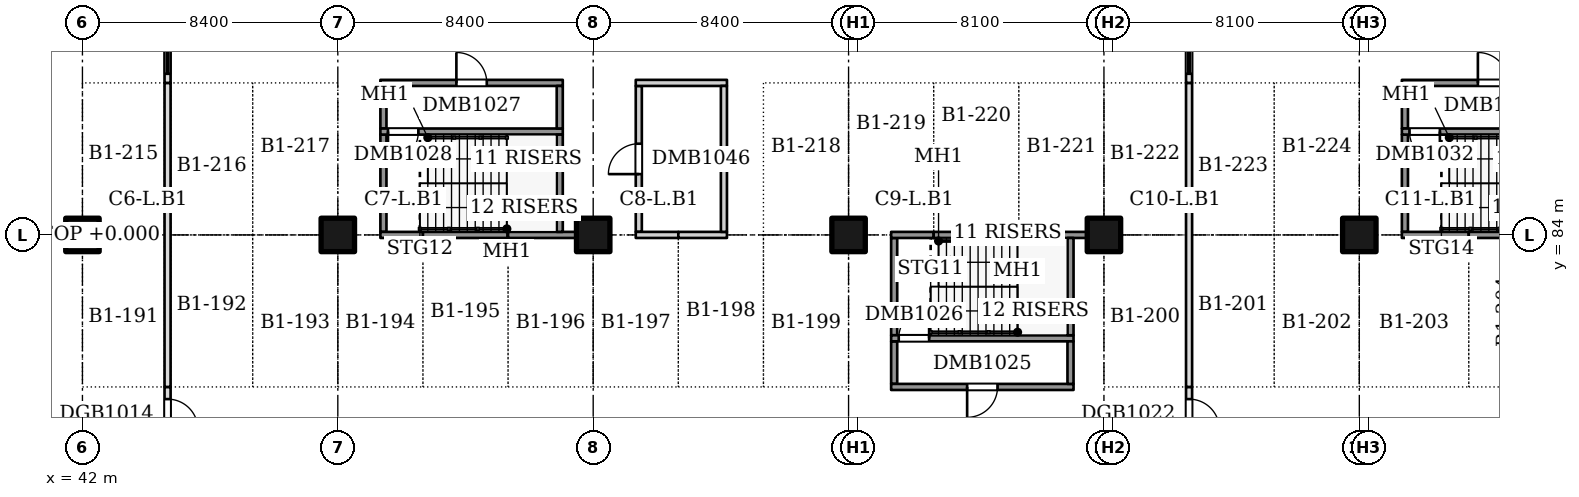
"""IFC4 building model, lengths in metres.
Left out: names, types, materials, properties, quantities, classifications, styles, units other than length and angle.
Written with IfcOpenShell. Run it as: python <this file> out.ifc"""

import sys

from ifc_helpers import new_model, si_unit, direction, frame, frame_2d, origin, origin_2d, place, context, subcontext, project, spatial, rectangle, extrude, element, fill, save


model = new_model("IFC4")
c1 = context("Model", 3, precision=1e-05, world=origin(), true_north=direction((0.0, 1.0)))
c2 = subcontext(c1, "Body", "Model", "MODEL_VIEW")
j1 = project(units=[si_unit("LENGTHUNIT", "METRE"), si_unit("PLANEANGLEUNIT", "RADIAN")], contexts=[c1])
p1 = place(None, origin())
s1 = spatial("IfcSite", under=j1, at=p1, CompositionType="ELEMENT")
p2 = place(p1, origin())
s2 = spatial("IfcBuilding", under=s1, at=p2, CompositionType="ELEMENT")
p3 = place(p2, frame((0.0, 0.0, -4.0)))
s3 = spatial("IfcBuildingStorey", under=s2, at=p3, CompositionType="ELEMENT", Elevation=-4.0)
for number, where, z_axis, x_axis in (
    (1, (42.0, 84.0, 0.0), (0.0, 0.0, 1.0), (1.0, 0.0, 0.0)),
    (2, (50.4, 84.0, 0.0), (0.0, 0.0, 1.0), (1.0, 0.0, 0.0)),
    (3, (58.8, 84.0, 0.0), (0.0, 0.0, 1.0), (1.0, 0.0, 0.0)),
    (4, (67.2, 84.0, 0.0), (0.0, 0.0, 1.0), (1.0, 0.0, 0.0)),
    (5, (75.6, 84.0, 0.0), (0.0, 0.0, 1.0), (1.0, 0.0, 0.0)),
    (6, (84.0, 84.0, 0.0), (0.0, 0.0, 1.0), (1.0, 0.0, 0.0)),
):
    element("IfcColumn", number, at=place(p3, frame(where, z_axis=z_axis, x_axis=x_axis)), inside=s3, PredefinedType="COLUMN", context=c2, shape_type="SweptSolid", body=[
        extrude(rectangle(XDim=1.1, YDim=1.1, at=origin_2d()), origin(), (0.0, 0.0, 1.0), 3.6),
    ])
p4 = place(p3, frame((51.9, 84.1, 0.0), z_axis=(0.0, 0.0, 1.0), x_axis=(0.0, 1.0, 0.0)))
e7 = element("IfcWall", 7, at=p4, inside=s3, PredefinedType="SOLIDWALL", context=c2, shape_type="SweptSolid", body=[
    extrude(rectangle(XDim=3.2, YDim=0.2, at=frame_2d((1.6, 0.0))), origin(), (0.0, 0.0, 1.0), 4.0),
])
for number, where, z_axis, x_axis in (
    (8, (51.8, 84.0, 0.0), (0.0, 0.0, 1.0), (1.0, 0.0, 0.0)),
    (9, (51.9, 87.5, 0.0), (0.0, 0.0, 1.0), (0.0, 1.0, 0.0)),
):
    element("IfcWall", number, at=place(p3, frame(where, z_axis=z_axis, x_axis=x_axis)), inside=s3, PredefinedType="SOLIDWALL", context=c2, shape_type="SweptSolid", body=[
        extrude(rectangle(XDim=1.4, YDim=0.2, at=frame_2d((0.7, 0.0))), origin(), (0.0, 0.0, 1.0), 4.0),
    ])
p5 = place(p3, frame((51.8, 87.4, 0.0), z_axis=(0.0, 0.0, 1.0), x_axis=(1.0, 0.0, 0.0)))
e10 = element("IfcWall", 10, at=p5, inside=s3, PredefinedType="SOLIDWALL", context=c2, shape_type="SweptSolid", body=[
    extrude(rectangle(XDim=6.0, YDim=0.2, at=frame_2d((3.0, 0.0))), origin(), (0.0, 0.0, 1.0), 4.0),
])
p6 = place(p5, frame((0.25, 0.0, 0.0)))
e11 = element("IfcOpeningElement", 11, at=p6, cuts=e10, PredefinedType="OPENING", context=c2, shape_type="SweptSolid", body=[
    extrude(rectangle(XDim=1.0, YDim=2.1, at=frame_2d((0.5, 1.05))), frame((0.0, 0.11, 0.0), z_axis=(0.0, -1.0, 0.0), x_axis=(1.0, 0.0, 0.0)), (0.0, 0.0, 1.0), 0.22),
])
p7 = place(p3, frame((51.8, 89.0, 0.0), z_axis=(0.0, 0.0, 1.0), x_axis=(1.0, 0.0, 0.0)))
e12 = element("IfcWall", 12, at=p7, inside=s3, PredefinedType="SOLIDWALL", context=c2, shape_type="SweptSolid", body=[
    extrude(rectangle(XDim=6.0, YDim=0.2, at=frame_2d((3.0, 0.0))), origin(), (0.0, 0.0, 1.0), 4.0),
])
p8 = place(p7, frame((2.5, 0.0, 0.0)))
e13 = element("IfcOpeningElement", 13, at=p8, cuts=e12, PredefinedType="OPENING", context=c2, shape_type="SweptSolid", body=[
    extrude(rectangle(XDim=1.0, YDim=2.1, at=frame_2d((0.5, 1.05))), frame((0.0, 0.11, 0.0), z_axis=(0.0, -1.0, 0.0), x_axis=(1.0, 0.0, 0.0)), (0.0, 0.0, 1.0), 0.22),
])
p9 = place(p3, frame((53.2, 84.0, 0.0), z_axis=(0.0, 0.0, 1.0), x_axis=(1.0, 0.0, 0.0)))
e14 = element("IfcWall", 14, at=p9, inside=s3, PredefinedType="SOLIDWALL", context=c2, shape_type="SweptSolid", body=[
    extrude(rectangle(XDim=2.8, YDim=0.2, at=frame_2d((1.4, 0.0))), origin(), (0.0, 0.0, 1.0), 4.0),
])
p10 = place(p3, frame((56.0, 84.0, 0.0), z_axis=(0.0, 0.0, 1.0), x_axis=(1.0, 0.0, 0.0)))
e15 = element("IfcWall", 15, at=p10, inside=s3, PredefinedType="SOLIDWALL", context=c2, shape_type="SweptSolid", body=[
    extrude(rectangle(XDim=2.25, YDim=0.2, at=frame_2d((1.125, 0.0))), origin(), (0.0, 0.0, 1.0), 4.0),
])
p11 = place(p3, frame((57.7, 84.1, 0.0), z_axis=(0.0, 0.0, 1.0), x_axis=(0.0, 1.0, 0.0)))
e16 = element("IfcWall", 16, at=p11, inside=s3, PredefinedType="SOLIDWALL", context=c2, shape_type="SweptSolid", body=[
    extrude(rectangle(XDim=3.2, YDim=0.2, at=frame_2d((1.6, 0.0))), origin(), (0.0, 0.0, 1.0), 4.0),
])
p12 = place(p3, frame((57.7, 87.5, 0.0), z_axis=(0.0, 0.0, 1.0), x_axis=(0.0, 1.0, 0.0)))
e17 = element("IfcWall", 17, at=p12, inside=s3, PredefinedType="SOLIDWALL", context=c2, shape_type="SweptSolid", body=[
    extrude(rectangle(XDim=1.4, YDim=0.2, at=frame_2d((0.7, 0.0))), origin(), (0.0, 0.0, 1.0), 4.0),
])
p13 = place(p3, frame((60.3, 84.1, 0.0), z_axis=(0.0, 0.0, 1.0), x_axis=(0.0, 1.0, 0.0)))
e18 = element("IfcWall", 18, at=p13, inside=s3, PredefinedType="PARTITIONING", context=c2, shape_type="SweptSolid", body=[
    extrude(rectangle(XDim=4.8, YDim=0.2, at=frame_2d((2.4, 0.0))), origin(), (0.0, 0.0, 1.0), 3.6),
])
p14 = place(p13, frame((1.9, 0.0, 0.0)))
e19 = element("IfcOpeningElement", 19, at=p14, cuts=e18, PredefinedType="OPENING", context=c2, shape_type="SweptSolid", body=[
    extrude(rectangle(XDim=1.0, YDim=2.1, at=frame_2d((0.5, 1.05))), frame((0.0, 0.11, 0.0), z_axis=(0.0, -1.0, 0.0), x_axis=(1.0, 0.0, 0.0)), (0.0, 0.0, 1.0), 0.22),
])
p15 = place(p3, frame((60.2, 84.0, 0.0), z_axis=(0.0, 0.0, 1.0), x_axis=(1.0, 0.0, 0.0)))
e20 = element("IfcWall", 20, at=p15, inside=s3, PredefinedType="PARTITIONING", context=c2, shape_type="SweptSolid", body=[
    extrude(rectangle(XDim=1.4, YDim=0.2, at=frame_2d((0.7, 0.0))), origin(), (0.0, 0.0, 1.0), 3.6),
])
p16 = place(p3, frame((60.2, 89.0, 0.0), z_axis=(0.0, 0.0, 1.0), x_axis=(1.0, 0.0, 0.0)))
e21 = element("IfcWall", 21, at=p16, inside=s3, PredefinedType="PARTITIONING", context=c2, shape_type="SweptSolid", body=[
    extrude(rectangle(XDim=3.0, YDim=0.2, at=frame_2d((1.5, 0.0))), origin(), (0.0, 0.0, 1.0), 3.6),
])
p17 = place(p3, frame((61.6, 84.0, 0.0), z_axis=(0.0, 0.0, 1.0), x_axis=(1.0, 0.0, 0.0)))
e22 = element("IfcWall", 22, at=p17, inside=s3, PredefinedType="PARTITIONING", context=c2, shape_type="SweptSolid", body=[
    extrude(rectangle(XDim=1.6, YDim=0.2, at=frame_2d((0.8, 0.0))), origin(), (0.0, 0.0, 1.0), 3.6),
])
p18 = place(p3, frame((63.1, 84.1, 0.0), z_axis=(0.0, 0.0, 1.0), x_axis=(0.0, 1.0, 0.0)))
e23 = element("IfcWall", 23, at=p18, inside=s3, PredefinedType="PARTITIONING", context=c2, shape_type="SweptSolid", body=[
    extrude(rectangle(XDim=4.8, YDim=0.2, at=frame_2d((2.4, 0.0))), origin(), (0.0, 0.0, 1.0), 3.6),
])
p19 = place(p3, frame((68.7, 79.1, 0.0), z_axis=(0.0, 0.0, 1.0), x_axis=(0.0, 1.0, 0.0)))
e24 = element("IfcWall", 24, at=p19, inside=s3, PredefinedType="SOLIDWALL", context=c2, shape_type="SweptSolid", body=[
    extrude(rectangle(XDim=1.4, YDim=0.2, at=frame_2d((0.7, 0.0))), origin(), (0.0, 0.0, 1.0), 4.0),
])
p20 = place(p3, frame((68.6, 79.0, 0.0), z_axis=(0.0, 0.0, 1.0), x_axis=(1.0, 0.0, 0.0)))
e25 = element("IfcWall", 25, at=p20, inside=s3, PredefinedType="SOLIDWALL", context=c2, shape_type="SweptSolid", body=[
    extrude(rectangle(XDim=6.0, YDim=0.2, at=frame_2d((3.0, 0.0))), origin(), (0.0, 0.0, 1.0), 4.0),
])
p21 = place(p20, frame((2.5, 0.0, 0.0)))
e26 = element("IfcOpeningElement", 26, at=p21, cuts=e25, PredefinedType="OPENING", context=c2, shape_type="SweptSolid", body=[
    extrude(rectangle(XDim=1.0, YDim=2.1, at=frame_2d((0.5, 1.05))), frame((0.0, 0.11, 0.0), z_axis=(0.0, -1.0, 0.0), x_axis=(1.0, 0.0, 0.0)), (0.0, 0.0, 1.0), 0.22),
])
p22 = place(p3, frame((68.7, 80.7, 0.0), z_axis=(0.0, 0.0, 1.0), x_axis=(0.0, 1.0, 0.0)))
e27 = element("IfcWall", 27, at=p22, inside=s3, PredefinedType="SOLIDWALL", context=c2, shape_type="SweptSolid", body=[
    extrude(rectangle(XDim=3.2, YDim=0.2, at=frame_2d((1.6, 0.0))), origin(), (0.0, 0.0, 1.0), 4.0),
])
p23 = place(p3, frame((68.6, 80.6, 0.0), z_axis=(0.0, 0.0, 1.0), x_axis=(1.0, 0.0, 0.0)))
e28 = element("IfcWall", 28, at=p23, inside=s3, PredefinedType="SOLIDWALL", context=c2, shape_type="SweptSolid", body=[
    extrude(rectangle(XDim=6.0, YDim=0.2, at=frame_2d((3.0, 0.0))), origin(), (0.0, 0.0, 1.0), 4.0),
])
p24 = place(p23, frame((0.25, 0.0, 0.0)))
e29 = element("IfcOpeningElement", 29, at=p24, cuts=e28, PredefinedType="OPENING", context=c2, shape_type="SweptSolid", body=[
    extrude(rectangle(XDim=1.0, YDim=2.1, at=frame_2d((0.5, 1.05))), frame((0.0, 0.11, 0.0), z_axis=(0.0, -1.0, 0.0), x_axis=(1.0, 0.0, 0.0)), (0.0, 0.0, 1.0), 0.22),
])
p25 = place(p3, frame((68.6, 84.0, 0.0), z_axis=(0.0, 0.0, 1.0), x_axis=(1.0, 0.0, 0.0)))
e30 = element("IfcWall", 30, at=p25, inside=s3, PredefinedType="SOLIDWALL", context=c2, shape_type="SweptSolid", body=[
    extrude(rectangle(XDim=1.4, YDim=0.2, at=frame_2d((0.7, 0.0))), origin(), (0.0, 0.0, 1.0), 4.0),
])
p26 = place(p3, frame((70.0, 84.0, 0.0), z_axis=(0.0, 0.0, 1.0), x_axis=(1.0, 0.0, 0.0)))
e31 = element("IfcWall", 31, at=p26, inside=s3, PredefinedType="SOLIDWALL", context=c2, shape_type="SweptSolid", body=[
    extrude(rectangle(XDim=2.8, YDim=0.2, at=frame_2d((1.4, 0.0))), origin(), (0.0, 0.0, 1.0), 4.0),
])
p27 = place(p3, frame((72.8, 84.0, 0.0), z_axis=(0.0, 0.0, 1.0), x_axis=(1.0, 0.0, 0.0)))
e32 = element("IfcWall", 32, at=p27, inside=s3, PredefinedType="SOLIDWALL", context=c2, shape_type="SweptSolid", body=[
    extrude(rectangle(XDim=2.25, YDim=0.2, at=frame_2d((1.125, 0.0))), origin(), (0.0, 0.0, 1.0), 4.0),
])
p28 = place(p3, frame((74.5, 79.1, 0.0), z_axis=(0.0, 0.0, 1.0), x_axis=(0.0, 1.0, 0.0)))
e33 = element("IfcWall", 33, at=p28, inside=s3, PredefinedType="SOLIDWALL", context=c2, shape_type="SweptSolid", body=[
    extrude(rectangle(XDim=1.4, YDim=0.2, at=frame_2d((0.7, 0.0))), origin(), (0.0, 0.0, 1.0), 4.0),
])
for number, where, z_axis, x_axis in (
    (34, (74.5, 80.7, 0.0), (0.0, 0.0, 1.0), (0.0, 1.0, 0.0)),
    (35, (85.5, 84.1, 0.0), (0.0, 0.0, 1.0), (0.0, 1.0, 0.0)),
):
    element("IfcWall", number, at=place(p3, frame(where, z_axis=z_axis, x_axis=x_axis)), inside=s3, PredefinedType="SOLIDWALL", context=c2, shape_type="SweptSolid", body=[
        extrude(rectangle(XDim=3.2, YDim=0.2, at=frame_2d((1.6, 0.0))), origin(), (0.0, 0.0, 1.0), 4.0),
    ])
p29 = place(p3, frame((85.4, 84.0, 0.0), z_axis=(0.0, 0.0, 1.0), x_axis=(1.0, 0.0, 0.0)))
e36 = element("IfcWall", 36, at=p29, inside=s3, PredefinedType="SOLIDWALL", context=c2, shape_type="SweptSolid", body=[
    extrude(rectangle(XDim=2.2, YDim=0.2, at=frame_2d((1.1, 0.0))), origin(), (0.0, 0.0, 1.0), 4.0),
])
p30 = place(p3, frame((85.5, 87.5, 0.0), z_axis=(0.0, 0.0, 1.0), x_axis=(0.0, 1.0, 0.0)))
e37 = element("IfcWall", 37, at=p30, inside=s3, PredefinedType="SOLIDWALL", context=c2, shape_type="SweptSolid", body=[
    extrude(rectangle(XDim=1.4, YDim=0.2, at=frame_2d((0.7, 0.0))), origin(), (0.0, 0.0, 1.0), 4.0),
])
p31 = place(p3, frame((85.4, 87.4, 0.0), z_axis=(0.0, 0.0, 1.0), x_axis=(1.0, 0.0, 0.0)))
e38 = element("IfcWall", 38, at=p31, inside=s3, PredefinedType="SOLIDWALL", context=c2, shape_type="SweptSolid", body=[
    extrude(rectangle(XDim=6.0, YDim=0.2, at=frame_2d((3.0, 0.0))), origin(), (0.0, 0.0, 1.0), 4.0),
])
p32 = place(p31, frame((0.25, 0.0, 0.0)))
e39 = element("IfcOpeningElement", 39, at=p32, cuts=e38, PredefinedType="OPENING", context=c2, shape_type="SweptSolid", body=[
    extrude(rectangle(XDim=1.0, YDim=2.1, at=frame_2d((0.5, 1.05))), frame((0.0, 0.11, 0.0), z_axis=(0.0, -1.0, 0.0), x_axis=(1.0, 0.0, 0.0)), (0.0, 0.0, 1.0), 0.22),
])
p33 = place(p3, frame((85.4, 89.0, 0.0), z_axis=(0.0, 0.0, 1.0), x_axis=(1.0, 0.0, 0.0)))
e40 = element("IfcWall", 40, at=p33, inside=s3, PredefinedType="SOLIDWALL", context=c2, shape_type="SweptSolid", body=[
    extrude(rectangle(XDim=6.0, YDim=0.2, at=frame_2d((3.0, 0.0))), origin(), (0.0, 0.0, 1.0), 4.0),
])
p34 = place(p33, frame((2.5, 0.0, 0.0)))
e41 = element("IfcOpeningElement", 41, at=p34, cuts=e40, PredefinedType="OPENING", context=c2, shape_type="SweptSolid", body=[
    extrude(rectangle(XDim=1.0, YDim=2.1, at=frame_2d((0.5, 1.05))), frame((0.0, 0.11, 0.0), z_axis=(0.0, -1.0, 0.0), x_axis=(1.0, 0.0, 0.0)), (0.0, 0.0, 1.0), 0.22),
])
p35 = place(p3, frame((87.6, 84.0, 0.0), z_axis=(0.0, 0.0, 1.0), x_axis=(1.0, 0.0, 0.0)))
e42 = element("IfcWall", 42, at=p35, inside=s3, PredefinedType="SOLIDWALL", context=c2, shape_type="SweptSolid", body=[
    extrude(rectangle(XDim=2.4, YDim=0.2, at=frame_2d((1.2, 0.0))), origin(), (0.0, 0.0, 1.0), 4.0),
])
p36 = place(p3, frame((44.8, 72.2, 0.0), z_axis=(0.0, 0.0, 1.0), x_axis=(0.0, 1.0, 0.0)))
e43 = element("IfcWall", 43, at=p36, inside=s3, PredefinedType="PARTITIONING", context=c2, shape_type="SweptSolid", body=[
    extrude(rectangle(XDim=6.8, YDim=0.2, at=frame_2d((3.4, 0.0))), origin(), (0.0, 0.0, 1.0), 3.6),
])
p37 = place(p36, frame((0.3, 0.0, 0.0)))
e44 = element("IfcOpeningElement", 44, at=p37, cuts=e43, PredefinedType="OPENING", context=c2, shape_type="SweptSolid", body=[
    extrude(rectangle(XDim=4.8, YDim=2.4, at=frame_2d((2.4, 1.2))), frame((0.0, 0.11, 0.0), z_axis=(0.0, -1.0, 0.0), x_axis=(1.0, 0.0, 0.0)), (0.0, 0.0, 1.0), 0.22),
])
p38 = place(p36, frame((5.4, 0.0, 0.0)))
e45 = element("IfcOpeningElement", 45, at=p38, cuts=e43, PredefinedType="OPENING", context=c2, shape_type="SweptSolid", body=[
    extrude(rectangle(XDim=1.0, YDim=2.1, at=frame_2d((0.5, 1.05))), frame((0.0, 0.11, 0.0), z_axis=(0.0, -1.0, 0.0), x_axis=(1.0, 0.0, 0.0)), (0.0, 0.0, 1.0), 0.22),
])
p39 = place(p3, frame((44.8, 79.0, 0.0), z_axis=(0.0, 0.0, 1.0), x_axis=(0.0, 1.0, 0.0)))
e46 = element("IfcWall", 46, at=p39, inside=s3, PredefinedType="PARTITIONING", context=c2, shape_type="SweptSolid", body=[
    extrude(rectangle(XDim=10.0, YDim=0.2, at=frame_2d((5.0, 0.0))), origin(), (0.0, 0.0, 1.0), 3.6),
])
p40 = place(p3, frame((44.8, 89.0, 0.0), z_axis=(0.0, 0.0, 1.0), x_axis=(0.0, 1.0, 0.0)))
e47 = element("IfcWall", 47, at=p40, inside=s3, PredefinedType="PARTITIONING", context=c2, shape_type="SweptSolid", body=[
    extrude(rectangle(XDim=6.8, YDim=0.2, at=frame_2d((3.4, 0.0))), origin(), (0.0, 0.0, 1.0), 3.6),
])
p41 = place(p40, frame((0.3, 0.0, 0.0)))
e48 = element("IfcOpeningElement", 48, at=p41, cuts=e47, PredefinedType="OPENING", context=c2, shape_type="SweptSolid", body=[
    extrude(rectangle(XDim=4.8, YDim=2.4, at=frame_2d((2.4, 1.2))), frame((0.0, 0.11, 0.0), z_axis=(0.0, -1.0, 0.0), x_axis=(1.0, 0.0, 0.0)), (0.0, 0.0, 1.0), 0.22),
])
p42 = place(p40, frame((5.4, 0.0, 0.0)))
e49 = element("IfcOpeningElement", 49, at=p42, cuts=e47, PredefinedType="OPENING", context=c2, shape_type="SweptSolid", body=[
    extrude(rectangle(XDim=1.0, YDim=2.1, at=frame_2d((0.5, 1.05))), frame((0.0, 0.11, 0.0), z_axis=(0.0, -1.0, 0.0), x_axis=(1.0, 0.0, 0.0)), (0.0, 0.0, 1.0), 0.22),
])
p43 = place(p3, frame((78.4, 72.2, 0.0), z_axis=(0.0, 0.0, 1.0), x_axis=(0.0, 1.0, 0.0)))
e50 = element("IfcWall", 50, at=p43, inside=s3, PredefinedType="PARTITIONING", context=c2, shape_type="SweptSolid", body=[
    extrude(rectangle(XDim=6.8, YDim=0.2, at=frame_2d((3.4, 0.0))), origin(), (0.0, 0.0, 1.0), 3.6),
])
p44 = place(p43, frame((0.3, 0.0, 0.0)))
e51 = element("IfcOpeningElement", 51, at=p44, cuts=e50, PredefinedType="OPENING", context=c2, shape_type="SweptSolid", body=[
    extrude(rectangle(XDim=4.8, YDim=2.4, at=frame_2d((2.4, 1.2))), frame((0.0, 0.11, 0.0), z_axis=(0.0, -1.0, 0.0), x_axis=(1.0, 0.0, 0.0)), (0.0, 0.0, 1.0), 0.22),
])
p45 = place(p43, frame((5.4, 0.0, 0.0)))
e52 = element("IfcOpeningElement", 52, at=p45, cuts=e50, PredefinedType="OPENING", context=c2, shape_type="SweptSolid", body=[
    extrude(rectangle(XDim=1.0, YDim=2.1, at=frame_2d((0.5, 1.05))), frame((0.0, 0.11, 0.0), z_axis=(0.0, -1.0, 0.0), x_axis=(1.0, 0.0, 0.0)), (0.0, 0.0, 1.0), 0.22),
])
p46 = place(p3, frame((78.4, 79.0, 0.0), z_axis=(0.0, 0.0, 1.0), x_axis=(0.0, 1.0, 0.0)))
e53 = element("IfcWall", 53, at=p46, inside=s3, PredefinedType="PARTITIONING", context=c2, shape_type="SweptSolid", body=[
    extrude(rectangle(XDim=10.0, YDim=0.2, at=frame_2d((5.0, 0.0))), origin(), (0.0, 0.0, 1.0), 3.6),
])
p47 = place(p3, frame((78.4, 89.0, 0.0), z_axis=(0.0, 0.0, 1.0), x_axis=(0.0, 1.0, 0.0)))
e54 = element("IfcWall", 54, at=p47, inside=s3, PredefinedType="PARTITIONING", context=c2, shape_type="SweptSolid", body=[
    extrude(rectangle(XDim=6.8, YDim=0.2, at=frame_2d((3.4, 0.0))), origin(), (0.0, 0.0, 1.0), 3.6),
])
p48 = place(p47, frame((0.3, 0.0, 0.0)))
e55 = element("IfcOpeningElement", 55, at=p48, cuts=e54, PredefinedType="OPENING", context=c2, shape_type="SweptSolid", body=[
    extrude(rectangle(XDim=4.8, YDim=2.4, at=frame_2d((2.4, 1.2))), frame((0.0, 0.11, 0.0), z_axis=(0.0, -1.0, 0.0), x_axis=(1.0, 0.0, 0.0)), (0.0, 0.0, 1.0), 0.22),
])
p49 = place(p47, frame((5.4, 0.0, 0.0)))
e56 = element("IfcOpeningElement", 56, at=p49, cuts=e54, PredefinedType="OPENING", context=c2, shape_type="SweptSolid", body=[
    extrude(rectangle(XDim=1.0, YDim=2.1, at=frame_2d((0.5, 1.05))), frame((0.0, 0.11, 0.0), z_axis=(0.0, -1.0, 0.0), x_axis=(1.0, 0.0, 0.0)), (0.0, 0.0, 1.0), 0.22),
])
p50 = place(p21, frame((1.0, 0.0, 0.0), z_axis=(0.0, 0.0, 1.0), x_axis=(-1.0, 0.0, 0.0)))
e57 = element("IfcDoor", 57, at=p50, inside=s3, OperationType="SINGLE_SWING_RIGHT", PredefinedType="DOOR", context=c2, shape_type="SweptSolid", body=[
    extrude(rectangle(XDim=1.0, YDim=2.1, at=frame_2d((0.5, 1.05))), frame((0.0, 0.025, 0.0), z_axis=(0.0, -1.0, 0.0), x_axis=(1.0, 0.0, 0.0)), (0.0, 0.0, 1.0), 0.05),
])
fill(e26, e57)
p51 = place(p24, origin())
e58 = element("IfcDoor", 58, at=p51, inside=s3, OperationType="SINGLE_SWING_RIGHT", PredefinedType="DOOR", context=c2, shape_type="SweptSolid", body=[
    extrude(rectangle(XDim=1.0, YDim=2.1, at=frame_2d((0.5, 1.05))), frame((0.0, 0.025, 0.0), z_axis=(0.0, -1.0, 0.0), x_axis=(1.0, 0.0, 0.0)), (0.0, 0.0, 1.0), 0.05),
])
fill(e29, e58)
p52 = place(p8, origin())
e59 = element("IfcDoor", 59, at=p52, inside=s3, OperationType="SINGLE_SWING_LEFT", PredefinedType="DOOR", context=c2, shape_type="SweptSolid", body=[
    extrude(rectangle(XDim=1.0, YDim=2.1, at=frame_2d((0.5, 1.05))), frame((0.0, 0.025, 0.0), z_axis=(0.0, -1.0, 0.0), x_axis=(1.0, 0.0, 0.0)), (0.0, 0.0, 1.0), 0.05),
])
fill(e13, e59)
p53 = place(p6, frame((1.0, 0.0, 0.0), z_axis=(0.0, 0.0, 1.0), x_axis=(-1.0, 0.0, 0.0)))
e60 = element("IfcDoor", 60, at=p53, inside=s3, OperationType="SINGLE_SWING_RIGHT", PredefinedType="DOOR", context=c2, shape_type="SweptSolid", body=[
    extrude(rectangle(XDim=1.0, YDim=2.1, at=frame_2d((0.5, 1.05))), frame((0.0, 0.025, 0.0), z_axis=(0.0, -1.0, 0.0), x_axis=(1.0, 0.0, 0.0)), (0.0, 0.0, 1.0), 0.05),
])
fill(e11, e60)
p54 = place(p34, origin())
e61 = element("IfcDoor", 61, at=p54, inside=s3, OperationType="SINGLE_SWING_LEFT", PredefinedType="DOOR", context=c2, shape_type="SweptSolid", body=[
    extrude(rectangle(XDim=1.0, YDim=2.1, at=frame_2d((0.5, 1.05))), frame((0.0, 0.025, 0.0), z_axis=(0.0, -1.0, 0.0), x_axis=(1.0, 0.0, 0.0)), (0.0, 0.0, 1.0), 0.05),
])
fill(e41, e61)
p55 = place(p32, frame((1.0, 0.0, 0.0), z_axis=(0.0, 0.0, 1.0), x_axis=(-1.0, 0.0, 0.0)))
e62 = element("IfcDoor", 62, at=p55, inside=s3, OperationType="SINGLE_SWING_LEFT", PredefinedType="DOOR", context=c2, shape_type="SweptSolid", body=[
    extrude(rectangle(XDim=1.0, YDim=2.1, at=frame_2d((0.5, 1.05))), frame((0.0, 0.025, 0.0), z_axis=(0.0, -1.0, 0.0), x_axis=(1.0, 0.0, 0.0)), (0.0, 0.0, 1.0), 0.05),
])
fill(e39, e62)
p56 = place(p14, origin())
e63 = element("IfcDoor", 63, at=p56, inside=s3, OperationType="SINGLE_SWING_LEFT", PredefinedType="DOOR", context=c2, shape_type="SweptSolid", body=[
    extrude(rectangle(XDim=1.0, YDim=2.1, at=frame_2d((0.5, 1.05))), frame((0.0, 0.025, 0.0), z_axis=(0.0, -1.0, 0.0), x_axis=(1.0, 0.0, 0.0)), (0.0, 0.0, 1.0), 0.05),
])
fill(e19, e63)
p57 = place(p38, frame((1.0, 0.0, 0.0), z_axis=(0.0, 0.0, 1.0), x_axis=(-1.0, 0.0, 0.0)))
e64 = element("IfcDoor", 64, at=p57, inside=s3, OperationType="SINGLE_SWING_RIGHT", PredefinedType="DOOR", context=c2, shape_type="SweptSolid", body=[
    extrude(rectangle(XDim=1.0, YDim=2.1, at=frame_2d((0.5, 1.05))), frame((0.0, 0.025, 0.0), z_axis=(0.0, -1.0, 0.0), x_axis=(1.0, 0.0, 0.0)), (0.0, 0.0, 1.0), 0.05),
])
fill(e45, e64)
p58 = place(p41, origin())
e65 = element("IfcDoor", 65, at=p58, inside=s3, OperationType="ROLLINGUP", PredefinedType="GATE", context=c2, shape_type="SweptSolid", body=[
    extrude(rectangle(XDim=4.8, YDim=2.4, at=frame_2d((2.4, 1.2))), frame((0.0, 0.025, 0.0), z_axis=(0.0, -1.0, 0.0), x_axis=(1.0, 0.0, 0.0)), (0.0, 0.0, 1.0), 0.05),
])
fill(e48, e65)
p59 = place(p45, frame((1.0, 0.0, 0.0), z_axis=(0.0, 0.0, 1.0), x_axis=(-1.0, 0.0, 0.0)))
e66 = element("IfcDoor", 66, at=p59, inside=s3, OperationType="SINGLE_SWING_RIGHT", PredefinedType="DOOR", context=c2, shape_type="SweptSolid", body=[
    extrude(rectangle(XDim=1.0, YDim=2.1, at=frame_2d((0.5, 1.05))), frame((0.0, 0.025, 0.0), z_axis=(0.0, -1.0, 0.0), x_axis=(1.0, 0.0, 0.0)), (0.0, 0.0, 1.0), 0.05),
])
fill(e52, e66)
p60 = place(p48, origin())
e67 = element("IfcDoor", 67, at=p60, inside=s3, OperationType="ROLLINGUP", PredefinedType="GATE", context=c2, shape_type="SweptSolid", body=[
    extrude(rectangle(XDim=4.8, YDim=2.4, at=frame_2d((2.4, 1.2))), frame((0.0, 0.025, 0.0), z_axis=(0.0, -1.0, 0.0), x_axis=(1.0, 0.0, 0.0)), (0.0, 0.0, 1.0), 0.05),
])
fill(e55, e67)
save(model, sys.argv[1])
